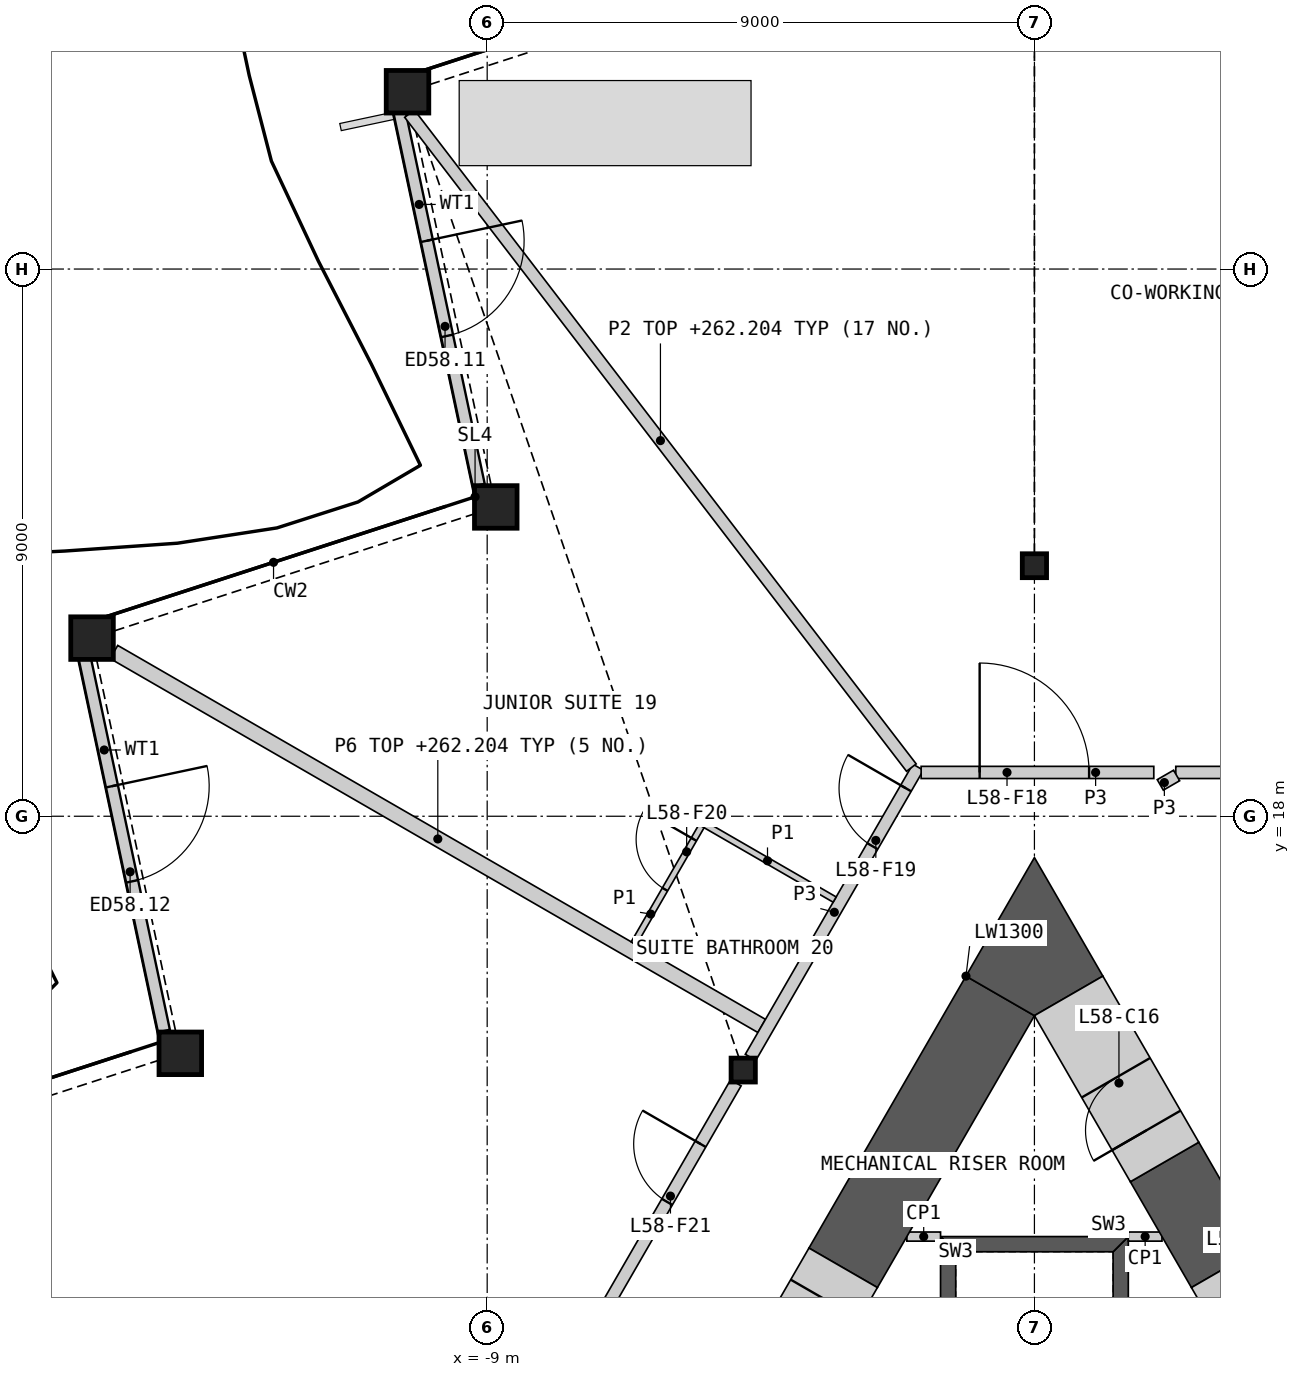
"""IFC4 building model, lengths in metres.
Left out: names, types, materials, properties, quantities, classifications, styles, units other than length and angle.
Written with IfcOpenShell. Run it as: python <this file> out.ifc"""

import sys

from ifc_helpers import new_model, si_unit, direction, frame, frame_2d, origin, origin_2d, place, context, subcontext, project, spatial, polyline, rectangle, hollow_rectangle, i_section, outline, extrude, element, fill, save


model = new_model("IFC4")
c1 = context("Model", 3, precision=1e-05, world=origin(), true_north=direction((0.0, 1.0)))
c2 = subcontext(c1, "Body", "Model", "MODEL_VIEW")
j1 = project(units=[si_unit("LENGTHUNIT", "METRE"), si_unit("PLANEANGLEUNIT", "RADIAN")], contexts=[c1])
p1 = place(None, origin())
s1 = spatial("IfcSite", under=j1, at=p1, CompositionType="ELEMENT")
p2 = place(p1, origin())
s2 = spatial("IfcBuilding", under=s1, at=p2, CompositionType="ELEMENT")
p3 = place(p2, frame((0.0, 0.0, 259.8)))
s3 = spatial("IfcBuildingStorey", under=s2, at=p3, CompositionType="ELEMENT", Elevation=259.8)
for number, where, z_axis, x_axis in (
    (1, (-10.31, 29.916, 0.0), (0.0, 0.0, 1.0), (1.0, 0.0, 0.0)),
    (2, (-8.859, 23.087, 0.0), (0.0, 0.0, 1.0), (1.0, 0.0, 0.0)),
    (3, (-15.499, 20.93, 0.0), (0.0, 0.0, 1.0), (1.0, 0.0, 0.0)),
    (4, (-14.047, 14.101, 0.0), (0.0, 0.0, 1.0), (1.0, 0.0, 0.0)),
):
    element("IfcColumn", number, at=place(p3, frame(where, z_axis=z_axis, x_axis=x_axis)), inside=s3, PredefinedType="COLUMN", context=c2, shape_type="SweptSolid", body=[
        extrude(hollow_rectangle(XDim=0.7, YDim=0.7, WallThickness=0.045, at=origin_2d()), origin(), (0.0, 0.0, 1.0), 3.6),
    ])
for number, where, z_axis, x_axis in (
    (5, (0.0, 22.121, 0.0), (0.0, 0.0, 1.0), (1.0, 0.0, 0.0)),
    (6, (-4.789, 13.825, 0.0), (0.0, 0.0, 1.0), (1.0, 0.0, 0.0)),
):
    element("IfcColumn", number, at=place(p3, frame(where, z_axis=z_axis, x_axis=x_axis)), inside=s3, PredefinedType="COLUMN", context=c2, shape_type="SweptSolid", body=[
        extrude(i_section(OverallWidth=0.399, OverallDepth=0.393, WebThickness=0.023, FlangeThickness=0.037, at=origin_2d()), origin(), (0.0, 0.0, 1.0), 3.6),
    ])
p4 = place(p3, frame((-10.446, 29.602, 0.0), z_axis=(0.0, 0.0, 1.0), x_axis=(0.207926028339, -0.97814455309, 0.0)))
e7 = element("IfcWall", 7, at=p4, inside=s3, PredefinedType="SOLIDWALL", context=c2, shape_type="SweptSolid", body=[
    extrude(rectangle(XDim=6.293, YDim=0.2, at=frame_2d((3.147, 0.0))), origin(), (0.0, 0.0, 1.0), 2.701),
])
p5 = place(p4, frame((2.184, 0.0, 0.0)))
e8 = element("IfcOpeningElement", 8, at=p5, cuts=e7, PredefinedType="OPENING", context=c2, shape_type="SweptSolid", body=[
    extrude(rectangle(XDim=1.6, YDim=2.4, at=frame_2d((0.8, 1.2))), frame((0.0, 0.11, 0.0), z_axis=(0.0, -1.0, 0.0), x_axis=(1.0, 0.0, 0.0)), (0.0, 0.0, 1.0), 0.22),
])
p6 = place(p3, frame((-15.626, 20.631, 0.0), z_axis=(0.0, 0.0, 1.0), x_axis=(0.207882853761, -0.978153729795, 0.0)))
e9 = element("IfcWall", 9, at=p6, inside=s3, PredefinedType="SOLIDWALL", context=c2, shape_type="SweptSolid", body=[
    extrude(rectangle(XDim=6.301, YDim=0.2, at=frame_2d((3.15, 0.0))), origin(), (0.0, 0.0, 1.0), 2.701),
])
p7 = place(p6, frame((2.184, 0.0, 0.0)))
e10 = element("IfcOpeningElement", 10, at=p7, cuts=e9, PredefinedType="OPENING", context=c2, shape_type="SweptSolid", body=[
    extrude(rectangle(XDim=1.6, YDim=2.4, at=frame_2d((0.8, 1.2))), frame((0.0, 0.11, 0.0), z_axis=(0.0, -1.0, 0.0), x_axis=(1.0, 0.0, 0.0)), (0.0, 0.0, 1.0), 0.22),
])
p8 = place(p3, origin())
e11 = element("IfcWall", 11, at=p8, inside=s3, PredefinedType="SHEAR", context=c2, shape_type="SweptSolid", body=[
    extrude(outline(polyline([(1.544, 5.237), (1.544, 11.087), (1.294, 10.837), (1.294, 5.237), (1.544, 5.237)])), origin(), (0.0, 0.0, 1.0), 3.25),
])
p9 = place(p3, origin())
e12 = element("IfcWall", 12, at=p9, inside=s3, PredefinedType="SHEAR", context=c2, shape_type="SweptSolid", body=[
    extrude(outline(polyline([(1.544, 11.087), (-1.544, 11.087), (-1.294, 10.837), (1.294, 10.837), (1.544, 11.087)])), origin(), (0.0, 0.0, 1.0), 3.25),
])
p10 = place(p3, origin())
e13 = element("IfcWall", 13, at=p10, inside=s3, PredefinedType="SHEAR", context=c2, shape_type="SweptSolid", body=[
    extrude(outline(polyline([(-1.294, 10.837), (-1.544, 11.087), (-1.544, 5.237), (-1.294, 5.237), (-1.294, 10.837)])), origin(), (0.0, 0.0, 1.0), 3.25),
])
for number, where, z_axis, x_axis in (
    (14, (1.544, 11.087, 0.0), (0.0, 0.0, 1.0), (1.0, 0.0, 0.0)),
    (15, (-1.544, 11.087, 0.0), (0.0, 0.0, 1.0), (-1.0, 0.0, 0.0)),
):
    element("IfcWall", number, at=place(p3, frame(where, z_axis=z_axis, x_axis=x_axis)), inside=s3, PredefinedType="PARTITIONING", context=c2, shape_type="SweptSolid", body=[
        extrude(rectangle(XDim=0.554, YDim=0.15, at=frame_2d((0.277, 0.0))), origin(), (0.0, 0.0, 1.0), 3.25),
    ])
p11 = place(p3, frame((3.145, 10.573, 0.0), z_axis=(0.0, 0.0, 1.0), x_axis=(-0.500006371327, 0.866021725266, 0.0)))
e16 = element("IfcWall", 16, at=p11, inside=s3, PredefinedType="SHEAR", context=c2, shape_type="SweptSolid", body=[
    extrude(rectangle(XDim=2.01, YDim=1.3, at=frame_2d((1.005, 0.0))), origin(), (0.0, 0.0, 1.0), 3.25),
])
p12 = place(p3, frame((-0.563, 15.045, 0.0), z_axis=(0.0, 0.0, 1.0), x_axis=(-0.499982995661, -0.866035221021, 0.0)))
e17 = element("IfcWall", 17, at=p12, inside=s3, PredefinedType="SHEAR", context=c2, shape_type="SweptSolid", body=[
    extrude(rectangle(XDim=5.164, YDim=1.3, at=frame_2d((2.582, 0.0))), origin(), (0.0, 0.0, 1.0), 3.25),
])
p13 = place(p3, origin())
e18 = element("IfcWall", 18, at=p13, inside=s3, PredefinedType="SHEAR", context=c2, shape_type="SweptSolid", body=[
    extrude(outline(polyline([(-1.126, 15.371), (0.0, 17.321), (1.126, 15.371), (0.0, 14.72), (-1.126, 15.371)])), origin(), (0.0, 0.0, 1.0), 3.25),
])
p14 = place(p3, frame((2.14, 12.313, 0.0), z_axis=(0.0, 0.0, 1.0), x_axis=(-0.499968102766, 0.866043818878, 0.0)))
e19 = element("IfcWall", 19, at=p14, inside=s3, PredefinedType="SHEAR", context=c2, shape_type="SweptSolid", body=[
    extrude(rectangle(XDim=3.155, YDim=1.3, at=frame_2d((1.577, 0.0))), origin(), (0.0, 0.0, 1.0), 3.25),
])
p15 = place(p14, frame((0.6, 0.0, 0.0)))
e20 = element("IfcOpeningElement", 20, at=p15, cuts=e19, PredefinedType="OPENING", context=c2, shape_type="SweptSolid", body=[
    extrude(rectangle(XDim=1.0, YDim=2.1, at=frame_2d((0.5, 1.05))), frame((0.0, 0.66, 0.0), z_axis=(0.0, -1.0, 0.0), x_axis=(1.0, 0.0, 0.0)), (0.0, 0.0, 1.0), 1.32),
])
p16 = place(p3, frame((4.245, 8.668, 0.0), z_axis=(0.0, 0.0, 1.0), x_axis=(-0.50002983664, 0.866008176907, 0.0)))
e21 = element("IfcWall", 21, at=p16, inside=s3, PredefinedType="SHEAR", context=c2, shape_type="SweptSolid", body=[
    extrude(rectangle(XDim=2.2, YDim=1.3, at=frame_2d((1.1, 0.0))), origin(), (0.0, 0.0, 1.0), 3.25),
])
p17 = place(p16, frame((0.6, 0.0, 0.0)))
e22 = element("IfcOpeningElement", 22, at=p17, cuts=e21, PredefinedType="OPENING", context=c2, shape_type="SweptSolid", body=[
    extrude(rectangle(XDim=1.0, YDim=2.1, at=frame_2d((0.5, 1.05))), frame((0.0, 0.66, 0.0), z_axis=(0.0, -1.0, 0.0), x_axis=(1.0, 0.0, 0.0)), (0.0, 0.0, 1.0), 1.32),
])
p18 = place(p3, frame((-3.145, 10.573, 0.0), z_axis=(0.0, 0.0, 1.0), x_axis=(-0.50002983664, -0.866008176907, 0.0)))
e23 = element("IfcWall", 23, at=p18, inside=s3, PredefinedType="SHEAR", context=c2, shape_type="SweptSolid", body=[
    extrude(rectangle(XDim=2.2, YDim=1.3, at=frame_2d((1.1, 0.0))), origin(), (0.0, 0.0, 1.0), 3.25),
])
p19 = place(p18, frame((0.6, 0.0, 0.0)))
e24 = element("IfcOpeningElement", 24, at=p19, cuts=e23, PredefinedType="OPENING", context=c2, shape_type="SweptSolid", body=[
    extrude(rectangle(XDim=1.0, YDim=2.1, at=frame_2d((0.5, 1.05))), frame((0.0, 0.66, 0.0), z_axis=(0.0, -1.0, 0.0), x_axis=(1.0, 0.0, 0.0)), (0.0, 0.0, 1.0), 1.32),
])
p20 = place(p3, frame((-15.138, 20.702, 0.0), z_axis=(0.0, 0.0, 1.0), x_axis=(0.86602627735, -0.499998486937, 0.0)))
e25 = element("IfcWall", 25, at=p20, inside=s3, PredefinedType="PARTITIONING", context=c2, shape_type="SweptSolid", body=[
    extrude(rectangle(XDim=12.301, YDim=0.25, at=frame_2d((6.15, 0.0))), origin(), (0.0, 0.0, 1.0), 2.404),
])
p21 = place(p3, frame((-9.458, 5.74, 0.0), z_axis=(0.0, 0.0, 1.0), x_axis=(0.50000207303, 0.866024206917, 0.0)))
e26 = element("IfcWall", 26, at=p21, inside=s3, PredefinedType="PARTITIONING", context=c2, shape_type="SweptSolid", body=[
    extrude(rectangle(XDim=9.095, YDim=0.2, at=frame_2d((4.547, 0.0))), origin(), (0.0, 0.0, 1.0), 3.25),
])
p22 = place(p21, frame((6.833, 0.0, 0.0)))
e27 = element("IfcOpeningElement", 27, at=p22, cuts=e26, PredefinedType="OPENING", context=c2, shape_type="SweptSolid", body=[
    extrude(rectangle(XDim=1.1, YDim=2.1, at=frame_2d((0.55, 1.05))), frame((0.0, 0.11, 0.0), z_axis=(0.0, -1.0, 0.0), x_axis=(1.0, 0.0, 0.0)), (0.0, 0.0, 1.0), 0.22),
])
p23 = place(p3, frame((-4.668, 14.035, 0.0), z_axis=(0.0, 0.0, 1.0), x_axis=(0.499984524817, 0.866034338201, 0.0)))
e28 = element("IfcWall", 28, at=p23, inside=s3, PredefinedType="PARTITIONING", context=c2, shape_type="SweptSolid", body=[
    extrude(rectangle(XDim=5.51, YDim=0.2, at=frame_2d((2.755, 0.0))), origin(), (0.0, 0.0, 1.0), 3.25),
])
p24 = place(p23, frame((4.01, 0.0, 0.0)))
e29 = element("IfcOpeningElement", 29, at=p24, cuts=e28, PredefinedType="OPENING", context=c2, shape_type="SweptSolid", body=[
    extrude(rectangle(XDim=1.1, YDim=2.1, at=frame_2d((0.55, 1.05))), frame((0.0, 0.11, 0.0), z_axis=(0.0, -1.0, 0.0), x_axis=(1.0, 0.0, 0.0)), (0.0, 0.0, 1.0), 0.22),
])
p25 = place(p3, frame((-1.863, 18.72, 0.0), z_axis=(0.0, 0.0, 1.0), x_axis=(1.0, 0.0, 0.0)))
e30 = element("IfcWall", 30, at=p25, inside=s3, PredefinedType="PARTITIONING", context=c2, shape_type="SweptSolid", body=[
    extrude(rectangle(XDim=3.826, YDim=0.2, at=frame_2d((1.913, 0.0))), origin(), (0.0, 0.0, 1.0), 3.25),
])
p26 = place(p25, frame((0.962, 0.0, 0.0)))
e31 = element("IfcOpeningElement", 31, at=p26, cuts=e30, PredefinedType="OPENING", context=c2, shape_type="SweptSolid", body=[
    extrude(rectangle(XDim=1.8, YDim=2.1, at=frame_2d((0.9, 1.05))), frame((0.0, 0.11, 0.0), z_axis=(0.0, -1.0, 0.0), x_axis=(1.0, 0.0, 0.0)), (0.0, 0.0, 1.0), 0.22),
])
p27 = place(p3, frame((2.325, 18.72, 0.0), z_axis=(0.0, 0.0, 1.0), x_axis=(1.0, 0.0, 0.0)))
e32 = element("IfcWall", 32, at=p27, inside=s3, PredefinedType="PARTITIONING", context=c2, shape_type="SweptSolid", body=[
    extrude(rectangle(XDim=3.002, YDim=0.2, at=frame_2d((1.501, 0.0))), origin(), (0.0, 0.0, 1.0), 3.25),
])
p28 = place(p3, frame((2.07, 18.515, 0.0), z_axis=(0.0, 0.0, 1.0), x_axis=(0.866054481515, 0.499949632511, 0.0)))
e33 = element("IfcWall", 33, at=p28, inside=s3, PredefinedType="PARTITIONING", context=c2, shape_type="SweptSolid", body=[
    extrude(rectangle(XDim=0.31, YDim=0.2, at=frame_2d((0.155, 0.0))), origin(), (0.0, 0.0, 1.0), 3.25),
])
p29 = place(p3, frame((-10.277, 29.556, 0.0), z_axis=(0.0, 0.0, 1.0), x_axis=(0.60876001101, -0.793354428358, 0.0)))
e34 = element("IfcWall", 34, at=p29, inside=s3, PredefinedType="PARTITIONING", context=c2, shape_type="SweptSolid", body=[
    extrude(rectangle(XDim=13.558, YDim=0.2, at=frame_2d((6.779, 0.0))), origin(), (0.0, 0.0, 1.0), 2.404),
])
p30 = place(p3, frame((-5.494, 17.905, 0.0), z_axis=(0.0, 0.0, 1.0), x_axis=(0.866030925526, -0.499990435942, 0.0)))
e35 = element("IfcWall", 35, at=p30, inside=s3, PredefinedType="PARTITIONING", context=c2, shape_type="SweptSolid", body=[
    extrude(rectangle(XDim=2.55, YDim=0.1, at=frame_2d((1.275, 0.0))), origin(), (0.0, 0.0, 1.0), 2.404),
])
p31 = place(p3, frame((-6.588, 15.909, 0.0), z_axis=(0.0, 0.0, 1.0), x_axis=(0.49999788721, 0.866026623601, 0.0)))
e36 = element("IfcWall", 36, at=p31, inside=s3, PredefinedType="PARTITIONING", context=c2, shape_type="SweptSolid", body=[
    extrude(rectangle(XDim=2.225, YDim=0.1, at=frame_2d((1.113, 0.0))), origin(), (0.0, 0.0, 1.0), 2.404),
])
p32 = place(p31, frame((1.025, 0.0, 0.0)))
e37 = element("IfcOpeningElement", 37, at=p32, cuts=e36, PredefinedType="OPENING", context=c2, shape_type="SweptSolid", body=[
    extrude(rectangle(XDim=0.95, YDim=2.1, at=frame_2d((0.475, 1.05))), frame((0.0, 0.06, 0.0), z_axis=(0.0, -1.0, 0.0), x_axis=(1.0, 0.0, 0.0)), (0.0, 0.0, 1.0), 0.12),
])
p33 = place(p5, origin())
e38 = element("IfcDoor", 38, at=p33, inside=s3, OperationType="DOUBLE_DOOR_SINGLE_SWING", PredefinedType="DOOR", context=c2, shape_type="SweptSolid", body=[
    extrude(rectangle(XDim=1.6, YDim=2.4, at=frame_2d((0.8, 1.2))), frame((0.0, 0.025, 0.0), z_axis=(0.0, -1.0, 0.0), x_axis=(1.0, 0.0, 0.0)), (0.0, 0.0, 1.0), 0.05),
])
fill(e8, e38)
p34 = place(p7, origin())
e39 = element("IfcDoor", 39, at=p34, inside=s3, OperationType="DOUBLE_DOOR_SINGLE_SWING", PredefinedType="DOOR", context=c2, shape_type="SweptSolid", body=[
    extrude(rectangle(XDim=1.6, YDim=2.4, at=frame_2d((0.8, 1.2))), frame((0.0, 0.025, 0.0), z_axis=(0.0, -1.0, 0.0), x_axis=(1.0, 0.0, 0.0)), (0.0, 0.0, 1.0), 0.05),
])
fill(e10, e39)
p35 = place(p15, origin())
e40 = element("IfcDoor", 40, at=p35, inside=s3, OperationType="SINGLE_SWING_LEFT", PredefinedType="DOOR", context=c2, shape_type="SweptSolid", body=[
    extrude(rectangle(XDim=1.0, YDim=2.1, at=frame_2d((0.5, 1.05))), frame((0.0, 0.405, 0.0), z_axis=(0.0, -1.0, 0.0), x_axis=(1.0, 0.0, 0.0)), (0.0, 0.0, 1.0), 0.05),
])
fill(e20, e40)
p36 = place(p26, origin())
e41 = element("IfcDoor", 41, at=p36, inside=s3, OperationType="DOUBLE_DOOR_SINGLE_SWING", PredefinedType="DOOR", context=c2, shape_type="SweptSolid", body=[
    extrude(rectangle(XDim=1.8, YDim=2.1, at=frame_2d((0.9, 1.05))), frame((0.0, 0.025, 0.0), z_axis=(0.0, -1.0, 0.0), x_axis=(1.0, 0.0, 0.0)), (0.0, 0.0, 1.0), 0.05),
])
fill(e31, e41)
p37 = place(p24, origin())
e42 = element("IfcDoor", 42, at=p37, inside=s3, OperationType="SINGLE_SWING_RIGHT", PredefinedType="DOOR", context=c2, shape_type="SweptSolid", body=[
    extrude(rectangle(XDim=1.1, YDim=2.1, at=frame_2d((0.55, 1.05))), frame((0.0, 0.025, 0.0), z_axis=(0.0, -1.0, 0.0), x_axis=(1.0, 0.0, 0.0)), (0.0, 0.0, 1.0), 0.05),
])
fill(e29, e42)
p38 = place(p32, origin())
e43 = element("IfcDoor", 43, at=p38, inside=s3, OperationType="SINGLE_SWING_RIGHT", PredefinedType="DOOR", context=c2, shape_type="SweptSolid", body=[
    extrude(rectangle(XDim=0.95, YDim=2.1, at=frame_2d((0.475, 1.05))), frame((0.0, 0.025, 0.0), z_axis=(0.0, -1.0, 0.0), x_axis=(1.0, 0.0, 0.0)), (0.0, 0.0, 1.0), 0.05),
])
fill(e37, e43)
p39 = place(p22, origin())
e44 = element("IfcDoor", 44, at=p39, inside=s3, OperationType="SINGLE_SWING_RIGHT", PredefinedType="DOOR", context=c2, shape_type="SweptSolid", body=[
    extrude(rectangle(XDim=1.1, YDim=2.1, at=frame_2d((0.55, 1.05))), frame((0.0, 0.025, 0.0), z_axis=(0.0, -1.0, 0.0), x_axis=(1.0, 0.0, 0.0)), (0.0, 0.0, 1.0), 0.05),
])
fill(e27, e44)
save(model, sys.argv[1])
